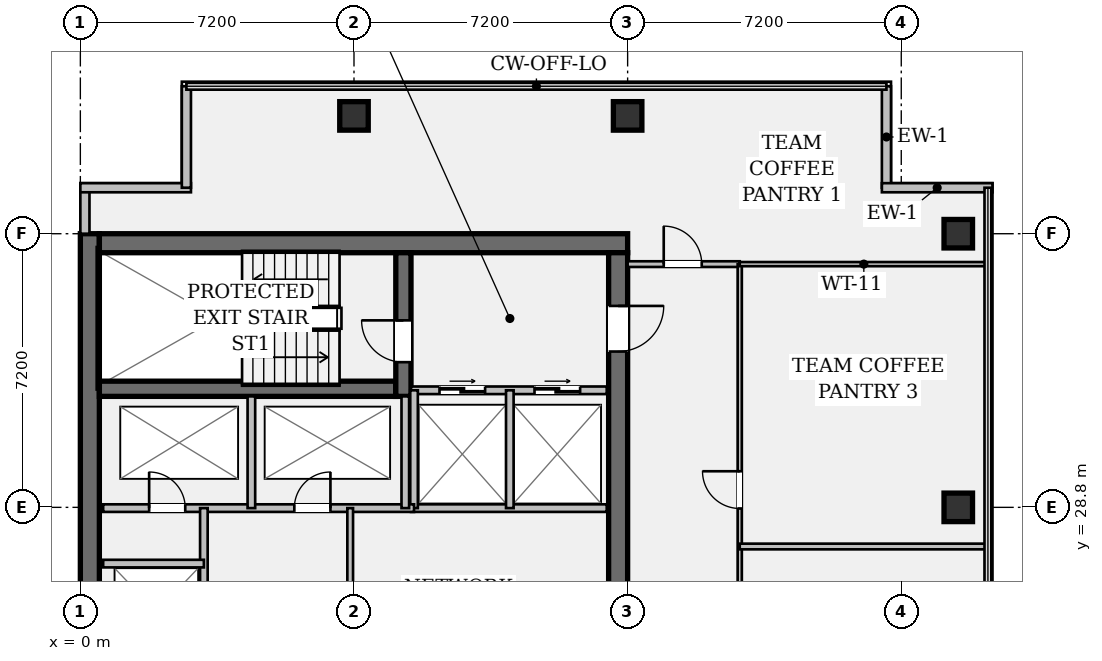
"""IFC4 building model, lengths in metres.
Left out: names, types, materials, properties, quantities, classifications, styles, units other than length and angle.
Written with IfcOpenShell. Run it as: python <this file> out.ifc"""

import sys

from ifc_helpers import new_model, si_unit, direction, frame, frame_2d, origin, origin_2d, place, context, subcontext, project, spatial, rectangle, hollow_rectangle, extrude, element, fill, save


model = new_model("IFC4")
c1 = context("Model", 3, precision=1e-05, world=origin(), true_north=direction((0.0, 1.0)))
c2 = subcontext(c1, "Body", "Model", "MODEL_VIEW")
j1 = project(units=[si_unit("LENGTHUNIT", "METRE"), si_unit("PLANEANGLEUNIT", "RADIAN")], contexts=[c1])
p1 = place(None, origin())
s1 = spatial("IfcSite", under=j1, at=p1, CompositionType="ELEMENT")
p2 = place(p1, origin())
s2 = spatial("IfcBuilding", under=s1, at=p2, CompositionType="ELEMENT")
p3 = place(p2, frame((0.0, 0.0, 218.75)))
s3 = spatial("IfcBuildingStorey", under=s2, at=p3, CompositionType="ELEMENT", Elevation=218.75)
p4 = place(p3, frame((0.25, 7.2, 0.0), z_axis=(0.0, 0.0, 1.0), x_axis=(0.0, 1.0, 0.0)))
e1 = element("IfcWall", 1, at=p4, inside=s3, PredefinedType="SHEAR", context=c2, shape_type="SweptSolid", body=[
    extrude(rectangle(XDim=28.8, YDim=0.5, at=frame_2d((14.4, 0.0))), origin(), (0.0, 0.0, 1.0), 3.24),
])
p5 = place(p3, frame((0.5, 35.75, 0.0), z_axis=(0.0, 0.0, 1.0), x_axis=(1.0, 0.0, 0.0)))
e2 = element("IfcWall", 2, at=p5, inside=s3, PredefinedType="SHEAR", context=c2, shape_type="SweptSolid", body=[
    extrude(rectangle(XDim=13.9, YDim=0.5, at=frame_2d((6.95, 0.0))), origin(), (0.0, 0.0, 1.0), 3.24),
])
p6 = place(p3, frame((14.15, 35.5, 0.0), z_axis=(0.0, 0.0, 1.0), x_axis=(0.0, -1.0, 0.0)))
e3 = element("IfcWall", 3, at=p6, inside=s3, PredefinedType="SHEAR", context=c2, shape_type="SweptSolid", body=[
    extrude(rectangle(XDim=27.8, YDim=0.5, at=frame_2d((13.9, 0.0))), origin(), (0.0, 0.0, 1.0), 3.24),
])
p7 = place(p6, frame((1.4, 0.0, 0.0)))
e4 = element("IfcOpeningElement", 4, at=p7, cuts=e3, PredefinedType="OPENING", context=c2, shape_type="SweptSolid", body=[
    extrude(rectangle(XDim=1.2, YDim=2.15, at=frame_2d((0.6, 1.075))), frame((0.0, 0.262, 0.0), z_axis=(0.0, -1.0, 0.0), x_axis=(1.0, 0.0, 0.0)), (0.0, 0.0, 1.0), 0.524),
])
p8 = place(p6, frame((25.35, 0.0, 0.0)))
e5 = element("IfcOpeningElement", 5, at=p8, cuts=e3, PredefinedType="OPENING", context=c2, shape_type="SweptSolid", body=[
    extrude(rectangle(XDim=1.2, YDim=2.15, at=frame_2d((0.6, 1.075))), frame((0.0, 0.262, 0.0), z_axis=(0.0, -1.0, 0.0), x_axis=(1.0, 0.0, 0.0)), (0.0, 0.0, 1.0), 0.524),
])
p9 = place(p6, frame((14.7, 0.0, 0.0)))
e6 = element("IfcOpeningElement", 6, at=p9, cuts=e3, PredefinedType="OPENING", context=c2, shape_type="SweptSolid", body=[
    extrude(rectangle(XDim=1.6, YDim=2.2, at=frame_2d((0.8, 1.1))), frame((0.0, 0.262, 0.0), z_axis=(0.0, -1.0, 0.0), x_axis=(1.0, 0.0, 0.0)), (0.0, 0.0, 1.0), 0.524),
])
p10 = place(p3, frame((0.5, 31.92, 0.0), z_axis=(0.0, 0.0, 1.0), x_axis=(1.0, 0.0, 0.0)))
e7 = element("IfcWall", 7, at=p10, inside=s3, PredefinedType="SHEAR", context=c2, shape_type="SweptSolid", body=[
    extrude(rectangle(XDim=7.8, YDim=0.4, at=frame_2d((3.9, 0.0))), origin(), (0.0, 0.0, 1.0), 3.24),
])
p11 = place(p3, frame((8.5, 31.72, 0.0), z_axis=(0.0, 0.0, 1.0), x_axis=(0.0, 1.0, 0.0)))
e8 = element("IfcWall", 8, at=p11, inside=s3, PredefinedType="SHEAR", context=c2, shape_type="SweptSolid", body=[
    extrude(rectangle(XDim=3.78, YDim=0.4, at=frame_2d((1.89, 0.0))), origin(), (0.0, 0.0, 1.0), 3.24),
])
p12 = place(p11, frame((0.9, 0.0, 0.0)))
e9 = element("IfcOpeningElement", 9, at=p12, cuts=e8, PredefinedType="OPENING", context=c2, shape_type="SweptSolid", body=[
    extrude(rectangle(XDim=1.1, YDim=2.15, at=frame_2d((0.55, 1.075))), frame((0.0, 0.212, 0.0), z_axis=(0.0, -1.0, 0.0), x_axis=(1.0, 0.0, 0.0)), (0.0, 0.0, 1.0), 0.424),
])
for number, where, z_axis, x_axis in (
    (10, (7.2, 39.1, 0.0), (0.0, 0.0, 1.0), (1.0, 0.0, 0.0)),
    (11, (14.4, 39.1, 0.0), (0.0, 0.0, 1.0), (1.0, 0.0, 0.0)),
    (12, (23.1, 28.8, 0.0), (0.0, 0.0, 1.0), (1.0, 0.0, 0.0)),
    (13, (23.1, 36.0, 0.0), (0.0, 0.0, 1.0), (1.0, 0.0, 0.0)),
):
    element("IfcColumn", number, at=place(p3, frame(where, z_axis=z_axis, x_axis=x_axis)), inside=s3, PredefinedType="COLUMN", context=c2, shape_type="SweptSolid", body=[
        extrude(hollow_rectangle(XDim=0.75, YDim=0.75, WallThickness=0.045, at=origin_2d()), origin(), (0.0, 0.0, 1.0), 3.24),
    ])
p13 = place(p3, frame((0.12, 36.0, 0.0), z_axis=(0.0, 0.0, 1.0), x_axis=(0.0, 1.0, 0.0)))
e14 = element("IfcWall", 14, at=p13, inside=s3, PredefinedType="STANDARD", context=c2, shape_type="SweptSolid", body=[
    extrude(rectangle(XDim=1.21, YDim=0.24, at=frame_2d((0.605, 0.0))), origin(), (0.0, 0.0, 1.0), 3.24),
])
p14 = place(p3, frame((0.0, 37.21, 0.0), z_axis=(0.0, 0.0, 1.0), x_axis=(1.0, 0.0, 0.0)))
e15 = element("IfcWall", 15, at=p14, inside=s3, PredefinedType="STANDARD", context=c2, shape_type="SweptSolid", body=[
    extrude(rectangle(XDim=2.91, YDim=0.24, at=frame_2d((1.455, 0.0))), origin(), (0.0, 0.0, 1.0), 3.24),
])
for number, where, z_axis, x_axis in (
    (16, (2.79, 37.21, 0.0), (0.0, 0.0, 1.0), (0.0, 1.0, 0.0)),
    (17, (21.21, 39.88, 0.0), (0.0, 0.0, 1.0), (0.0, -1.0, 0.0)),
):
    element("IfcWall", number, at=place(p3, frame(where, z_axis=z_axis, x_axis=x_axis)), inside=s3, PredefinedType="STANDARD", context=c2, shape_type="SweptSolid", body=[
        extrude(rectangle(XDim=2.67, YDim=0.24, at=frame_2d((1.335, 0.0))), origin(), (0.0, 0.0, 1.0), 3.24),
    ])
p15 = place(p3, frame((21.09, 37.21, 0.0), z_axis=(0.0, 0.0, 1.0), x_axis=(1.0, 0.0, 0.0)))
e18 = element("IfcWall", 18, at=p15, inside=s3, PredefinedType="STANDARD", context=c2, shape_type="SweptSolid", body=[
    extrude(rectangle(XDim=2.91, YDim=0.24, at=frame_2d((1.455, 0.0))), origin(), (0.0, 0.0, 1.0), 3.24),
])
p16 = place(p3, frame((8.7, 31.88, 0.0), z_axis=(0.0, 0.0, 1.0), x_axis=(1.0, 0.0, 0.0)))
e19 = element("IfcWall", 19, at=p16, inside=s3, PredefinedType="PARTITIONING", context=c2, shape_type="SweptSolid", body=[
    extrude(rectangle(XDim=5.15, YDim=0.2, at=frame_2d((2.575, 0.0))), origin(), (0.0, 0.0, 1.0), 3.24),
])
p17 = place(p16, frame((0.75, 0.0, 0.0)))
e20 = element("IfcOpeningElement", 20, at=p17, cuts=e19, PredefinedType="OPENING", context=c2, shape_type="SweptSolid", body=[
    extrude(rectangle(XDim=1.2, YDim=2.2, at=frame_2d((0.6, 1.1))), frame((0.0, 0.112, 0.0), z_axis=(0.0, -1.0, 0.0), x_axis=(1.0, 0.0, 0.0)), (0.0, 0.0, 1.0), 0.224),
])
p18 = place(p16, frame((3.25, 0.0, 0.0)))
e21 = element("IfcOpeningElement", 21, at=p18, cuts=e19, PredefinedType="OPENING", context=c2, shape_type="SweptSolid", body=[
    extrude(rectangle(XDim=1.2, YDim=2.2, at=frame_2d((0.6, 1.1))), frame((0.0, 0.112, 0.0), z_axis=(0.0, -1.0, 0.0), x_axis=(1.0, 0.0, 0.0)), (0.0, 0.0, 1.0), 0.224),
])
p19 = place(p3, frame((8.7, 28.78, 0.0), z_axis=(0.0, 0.0, 1.0), x_axis=(1.0, 0.0, 0.0)))
e22 = element("IfcWall", 22, at=p19, inside=s3, PredefinedType="PARTITIONING", context=c2, shape_type="SweptSolid", body=[
    extrude(rectangle(XDim=5.15, YDim=0.2, at=frame_2d((2.575, 0.0))), origin(), (0.0, 0.0, 1.0), 3.24),
])
for number, where, z_axis, x_axis in (
    (23, (8.78, 28.78, 0.0), (0.0, 0.0, 1.0), (0.0, 1.0, 0.0)),
    (24, (11.3, 28.78, 0.0), (0.0, 0.0, 1.0), (0.0, 1.0, 0.0)),
):
    element("IfcWall", number, at=place(p3, frame(where, z_axis=z_axis, x_axis=x_axis)), inside=s3, PredefinedType="PARTITIONING", context=c2, shape_type="SweptSolid", body=[
        extrude(rectangle(XDim=3.1, YDim=0.2, at=frame_2d((1.55, 0.0))), origin(), (0.0, 0.0, 1.0), 3.24),
    ])
p20 = place(p3, frame((0.6, 28.78, 0.0), z_axis=(0.0, 0.0, 1.0), x_axis=(1.0, 0.0, 0.0)))
e25 = element("IfcWall", 25, at=p20, inside=s3, PredefinedType="PARTITIONING", context=c2, shape_type="SweptSolid", body=[
    extrude(rectangle(XDim=8.18, YDim=0.2, at=frame_2d((4.09, 0.0))), origin(), (0.0, 0.0, 1.0), 3.24),
])
p21 = place(p20, frame((1.21, 0.0, 0.0)))
e26 = element("IfcOpeningElement", 26, at=p21, cuts=e25, PredefinedType="OPENING", context=c2, shape_type="SweptSolid", body=[
    extrude(rectangle(XDim=0.95, YDim=2.15, at=frame_2d((0.475, 1.075))), frame((0.0, 0.112, 0.0), z_axis=(0.0, -1.0, 0.0), x_axis=(1.0, 0.0, 0.0)), (0.0, 0.0, 1.0), 0.224),
])
p22 = place(p20, frame((5.03, 0.0, 0.0)))
e27 = element("IfcOpeningElement", 27, at=p22, cuts=e25, PredefinedType="OPENING", context=c2, shape_type="SweptSolid", body=[
    extrude(rectangle(XDim=0.95, YDim=2.15, at=frame_2d((0.475, 1.075))), frame((0.0, 0.112, 0.0), z_axis=(0.0, -1.0, 0.0), x_axis=(1.0, 0.0, 0.0)), (0.0, 0.0, 1.0), 0.224),
])
for number, where, z_axis, x_axis in (
    (28, (4.5, 28.78, 0.0), (0.0, 0.0, 1.0), (0.0, 1.0, 0.0)),
    (29, (8.55, 28.78, 0.0), (0.0, 0.0, 1.0), (0.0, 1.0, 0.0)),
):
    element("IfcWall", number, at=place(p3, frame(where, z_axis=z_axis, x_axis=x_axis)), inside=s3, PredefinedType="PARTITIONING", context=c2, shape_type="SweptSolid", body=[
        extrude(rectangle(XDim=2.94, YDim=0.2, at=frame_2d((1.47, 0.0))), origin(), (0.0, 0.0, 1.0), 3.24),
    ])
p23 = place(p3, frame((3.25, 15.7, 0.0), z_axis=(0.0, 0.0, 1.0), x_axis=(0.0, 1.0, 0.0)))
e30 = element("IfcWall", 30, at=p23, inside=s3, PredefinedType="PARTITIONING", context=c2, shape_type="SweptSolid", body=[
    extrude(rectangle(XDim=13.08, YDim=0.2, at=frame_2d((6.54, 0.0))), origin(), (0.0, 0.0, 1.0), 3.24),
])
p24 = place(p23, frame((0.9, 0.0, 0.0)))
e31 = element("IfcOpeningElement", 31, at=p24, cuts=e30, PredefinedType="OPENING", context=c2, shape_type="SweptSolid", body=[
    extrude(rectangle(XDim=1.1, YDim=2.2, at=frame_2d((0.55, 1.1))), frame((0.0, 0.112, 0.0), z_axis=(0.0, -1.0, 0.0), x_axis=(1.0, 0.0, 0.0)), (0.0, 0.0, 1.0), 0.224),
])
p25 = place(p23, frame((3.5, 0.0, 0.0)))
e32 = element("IfcOpeningElement", 32, at=p25, cuts=e30, PredefinedType="OPENING", context=c2, shape_type="SweptSolid", body=[
    extrude(rectangle(XDim=1.1, YDim=2.2, at=frame_2d((0.55, 1.1))), frame((0.0, 0.112, 0.0), z_axis=(0.0, -1.0, 0.0), x_axis=(1.0, 0.0, 0.0)), (0.0, 0.0, 1.0), 0.224),
])
p26 = place(p23, frame((7.2, 0.0, 0.0)))
e33 = element("IfcOpeningElement", 33, at=p26, cuts=e30, PredefinedType="OPENING", context=c2, shape_type="SweptSolid", body=[
    extrude(rectangle(XDim=1.1, YDim=2.2, at=frame_2d((0.55, 1.1))), frame((0.0, 0.112, 0.0), z_axis=(0.0, -1.0, 0.0), x_axis=(1.0, 0.0, 0.0)), (0.0, 0.0, 1.0), 0.224),
])
p27 = place(p23, frame((9.8, 0.0, 0.0)))
e34 = element("IfcOpeningElement", 34, at=p27, cuts=e30, PredefinedType="OPENING", context=c2, shape_type="SweptSolid", body=[
    extrude(rectangle(XDim=1.1, YDim=2.2, at=frame_2d((0.55, 1.1))), frame((0.0, 0.112, 0.0), z_axis=(0.0, -1.0, 0.0), x_axis=(1.0, 0.0, 0.0)), (0.0, 0.0, 1.0), 0.224),
])
p28 = place(p3, frame((0.6, 27.32, 0.0), z_axis=(0.0, 0.0, 1.0), x_axis=(1.0, 0.0, 0.0)))
e35 = element("IfcWall", 35, at=p28, inside=s3, PredefinedType="PARTITIONING", context=c2, shape_type="SweptSolid", body=[
    extrude(rectangle(XDim=2.65, YDim=0.2, at=frame_2d((1.325, 0.0))), origin(), (0.0, 0.0, 1.0), 3.24),
])
p29 = place(p3, frame((7.1, 22.2, 0.0), z_axis=(0.0, 0.0, 1.0), x_axis=(0.0, 1.0, 0.0)))
e36 = element("IfcWall", 36, at=p29, inside=s3, PredefinedType="PARTITIONING", context=c2, shape_type="SweptSolid", body=[
    extrude(rectangle(XDim=6.58, YDim=0.15, at=frame_2d((3.29, 0.0))), origin(), (0.0, 0.0, 1.0), 3.24),
])
p30 = place(p3, frame((14.4, 35.2, 0.0), z_axis=(0.0, 0.0, 1.0), x_axis=(1.0, 0.0, 0.0)))
e37 = element("IfcWall", 37, at=p30, inside=s3, PredefinedType="PARTITIONING", context=c2, shape_type="SweptSolid", body=[
    extrude(rectangle(XDim=2.95, YDim=0.15, at=frame_2d((1.475, 0.0))), origin(), (0.0, 0.0, 1.0), 2.808),
])
p31 = place(p30, frame((0.95, 0.0, 0.0)))
e38 = element("IfcOpeningElement", 38, at=p31, cuts=e37, PredefinedType="OPENING", context=c2, shape_type="SweptSolid", body=[
    extrude(rectangle(XDim=1.0, YDim=2.15, at=frame_2d((0.5, 1.075))), frame((0.0, 0.087, 0.0), z_axis=(0.0, -1.0, 0.0), x_axis=(1.0, 0.0, 0.0)), (0.0, 0.0, 1.0), 0.174),
])
p32 = place(p3, frame((17.35, 12.75, 0.0), z_axis=(0.0, 0.0, 1.0), x_axis=(0.0, 1.0, 0.0)))
e39 = element("IfcWall", 39, at=p32, inside=s3, PredefinedType="PARTITIONING", context=c2, shape_type="SweptSolid", body=[
    extrude(rectangle(XDim=22.45, YDim=0.11, at=frame_2d((11.225, 0.0))), origin(), (0.0, 0.0, 1.0), 2.613),
])
p33 = place(p32, frame((4.3, 0.0, 0.0)))
e40 = element("IfcOpeningElement", 40, at=p33, cuts=e39, PredefinedType="OPENING", context=c2, shape_type="SweptSolid", body=[
    extrude(rectangle(XDim=0.98, YDim=2.15, at=frame_2d((0.49, 1.075))), frame((0.0, 0.067, 0.0), z_axis=(0.0, -1.0, 0.0), x_axis=(1.0, 0.0, 0.0)), (0.0, 0.0, 1.0), 0.134),
])
p34 = place(p32, frame((8.0, 0.0, 0.0)))
e41 = element("IfcOpeningElement", 41, at=p34, cuts=e39, PredefinedType="OPENING", context=c2, shape_type="SweptSolid", body=[
    extrude(rectangle(XDim=0.98, YDim=2.15, at=frame_2d((0.49, 1.075))), frame((0.0, 0.067, 0.0), z_axis=(0.0, -1.0, 0.0), x_axis=(1.0, 0.0, 0.0)), (0.0, 0.0, 1.0), 0.134),
])
p35 = place(p32, frame((16.02, 0.0, 0.0)))
e42 = element("IfcOpeningElement", 42, at=p35, cuts=e39, PredefinedType="OPENING", context=c2, shape_type="SweptSolid", body=[
    extrude(rectangle(XDim=0.98, YDim=2.15, at=frame_2d((0.49, 1.075))), frame((0.0, 0.067, 0.0), z_axis=(0.0, -1.0, 0.0), x_axis=(1.0, 0.0, 0.0)), (0.0, 0.0, 1.0), 0.134),
])
p36 = place(p3, frame((17.35, 35.2, 0.0), z_axis=(0.0, 0.0, 1.0), x_axis=(1.0, 0.0, 0.0)))
e43 = element("IfcWall", 43, at=p36, inside=s3, PredefinedType="PARTITIONING", context=c2, shape_type="SweptSolid", body=[
    extrude(rectangle(XDim=6.53, YDim=0.11, at=frame_2d((3.265, 0.0))), origin(), (0.0, 0.0, 1.0), 2.808),
])
p37 = place(p3, frame((17.35, 27.77, 0.0), z_axis=(0.0, 0.0, 1.0), x_axis=(1.0, 0.0, 0.0)))
e44 = element("IfcWall", 44, at=p37, inside=s3, PredefinedType="PARTITIONING", context=c2, shape_type="SweptSolid", body=[
    extrude(rectangle(XDim=6.53, YDim=0.15, at=frame_2d((3.265, 0.0))), origin(), (0.0, 0.0, 1.0), 2.808),
])
p38 = place(p12, origin())
e45 = element("IfcDoor", 45, at=p38, inside=s3, OperationType="SINGLE_SWING_RIGHT", PredefinedType="DOOR", context=c2, shape_type="SweptSolid", body=[
    extrude(rectangle(XDim=1.1, YDim=2.15, at=frame_2d((0.55, 1.075))), frame((0.0, 0.025, 0.0), z_axis=(0.0, -1.0, 0.0), x_axis=(1.0, 0.0, 0.0)), (0.0, 0.0, 1.0), 0.05),
])
fill(e9, e45)
p39 = place(p7, origin())
e46 = element("IfcDoor", 46, at=p39, inside=s3, OperationType="SINGLE_SWING_LEFT", PredefinedType="DOOR", context=c2, shape_type="SweptSolid", body=[
    extrude(rectangle(XDim=1.2, YDim=2.15, at=frame_2d((0.6, 1.075))), frame((0.0, 0.025, 0.0), z_axis=(0.0, -1.0, 0.0), x_axis=(1.0, 0.0, 0.0)), (0.0, 0.0, 1.0), 0.05),
])
fill(e4, e46)
p40 = place(p17, origin())
e47 = element("IfcDoor", 47, at=p40, inside=s3, OperationType="DOUBLE_DOOR_SLIDING", PredefinedType="DOOR", context=c2, shape_type="SweptSolid", body=[
    extrude(rectangle(XDim=1.2, YDim=2.2, at=frame_2d((0.6, 1.1))), frame((0.0, 0.025, 0.0), z_axis=(0.0, -1.0, 0.0), x_axis=(1.0, 0.0, 0.0)), (0.0, 0.0, 1.0), 0.05),
])
fill(e20, e47)
p41 = place(p18, origin())
e48 = element("IfcDoor", 48, at=p41, inside=s3, OperationType="DOUBLE_DOOR_SLIDING", PredefinedType="DOOR", context=c2, shape_type="SweptSolid", body=[
    extrude(rectangle(XDim=1.2, YDim=2.2, at=frame_2d((0.6, 1.1))), frame((0.0, 0.025, 0.0), z_axis=(0.0, -1.0, 0.0), x_axis=(1.0, 0.0, 0.0)), (0.0, 0.0, 1.0), 0.05),
])
fill(e21, e48)
p42 = place(p21, origin())
e49 = element("IfcDoor", 49, at=p42, inside=s3, OperationType="SINGLE_SWING_LEFT", PredefinedType="DOOR", context=c2, shape_type="SweptSolid", body=[
    extrude(rectangle(XDim=0.95, YDim=2.15, at=frame_2d((0.475, 1.075))), frame((0.0, 0.025, 0.0), z_axis=(0.0, -1.0, 0.0), x_axis=(1.0, 0.0, 0.0)), (0.0, 0.0, 1.0), 0.05),
])
fill(e26, e49)
p43 = place(p22, origin())
e50 = element("IfcDoor", 50, at=p43, inside=s3, OperationType="SINGLE_SWING_RIGHT", PredefinedType="DOOR", context=c2, shape_type="SweptSolid", body=[
    extrude(rectangle(XDim=0.95, YDim=2.15, at=frame_2d((0.475, 1.075))), frame((0.0, 0.025, 0.0), z_axis=(0.0, -1.0, 0.0), x_axis=(1.0, 0.0, 0.0)), (0.0, 0.0, 1.0), 0.05),
])
fill(e27, e50)
p44 = place(p31, origin())
e51 = element("IfcDoor", 51, at=p44, inside=s3, OperationType="SINGLE_SWING_LEFT", PredefinedType="DOOR", context=c2, shape_type="SweptSolid", body=[
    extrude(rectangle(XDim=1.0, YDim=2.15, at=frame_2d((0.5, 1.075))), frame((0.0, 0.025, 0.0), z_axis=(0.0, -1.0, 0.0), x_axis=(1.0, 0.0, 0.0)), (0.0, 0.0, 1.0), 0.05),
])
fill(e38, e51)
p45 = place(p35, origin())
e52 = element("IfcDoor", 52, at=p45, inside=s3, OperationType="SINGLE_SWING_RIGHT", PredefinedType="DOOR", context=c2, shape_type="SweptSolid", body=[
    extrude(rectangle(XDim=0.98, YDim=2.15, at=frame_2d((0.49, 1.075))), frame((0.0, 0.025, 0.0), z_axis=(0.0, -1.0, 0.0), x_axis=(1.0, 0.0, 0.0)), (0.0, 0.0, 1.0), 0.05),
])
fill(e42, e52)
save(model, sys.argv[1])
